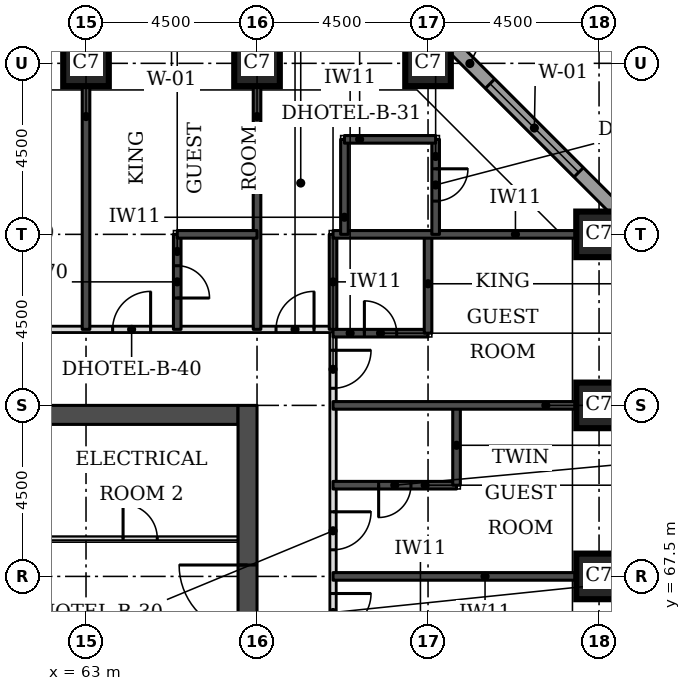
"""IFC4 building model, lengths in metres.
Left out: names, types, materials, properties, quantities, classifications, styles, units other than length and angle.
Written with IfcOpenShell. Run it as: python <this file> out.ifc"""

import sys

from ifc_helpers import new_model, si_unit, direction, frame, frame_2d, origin, origin_2d, place, context, subcontext, project, spatial, rectangle, extrude, element, fill, save


model = new_model("IFC4")
c1 = context("Model", 3, precision=1e-05, world=origin(), true_north=direction((0.0, 1.0)))
c2 = subcontext(c1, "Body", "Model", "MODEL_VIEW")
j1 = project(units=[si_unit("LENGTHUNIT", "METRE"), si_unit("PLANEANGLEUNIT", "RADIAN")], contexts=[c1])
p1 = place(None, origin())
s1 = spatial("IfcSite", under=j1, at=p1, CompositionType="ELEMENT")
p2 = place(p1, origin())
s2 = spatial("IfcBuilding", under=s1, at=p2, CompositionType="ELEMENT")
p3 = place(p2, frame((0.0, 0.0, 52.8)))
s3 = spatial("IfcBuildingStorey", under=s2, at=p3, CompositionType="ELEMENT", Elevation=52.8)
for number, where, z_axis, x_axis in (
    (1, (76.5, 67.5, 0.0), (0.0, 0.0, 1.0), (1.0, 0.0, 0.0)),
    (2, (76.5, 72.0, 0.0), (0.0, 0.0, 1.0), (1.0, 0.0, 0.0)),
    (3, (76.5, 76.5, 0.0), (0.0, 0.0, 1.0), (1.0, 0.0, 0.0)),
    (4, (63.0, 81.0, 0.0), (0.0, 0.0, 1.0), (1.0, 0.0, 0.0)),
    (5, (67.5, 81.0, 0.0), (0.0, 0.0, 1.0), (1.0, 0.0, 0.0)),
    (6, (72.0, 81.0, 0.0), (0.0, 0.0, 1.0), (1.0, 0.0, 0.0)),
):
    element("IfcColumn", number, at=place(p3, frame(where, z_axis=z_axis, x_axis=x_axis)), inside=s3, PredefinedType="COLUMN", context=c2, shape_type="SweptSolid", body=[
        extrude(rectangle(XDim=1.2, YDim=1.2, at=origin_2d()), origin(), (0.0, 0.0, 1.0), 3.3),
    ])
p4 = place(p3, frame((45.5, 71.75, 0.0), z_axis=(0.0, 0.0, 1.0), x_axis=(1.0, 0.0, 0.0)))
e7 = element("IfcWall", 7, at=p4, inside=s3, PredefinedType="SHEAR", context=c2, shape_type="SweptSolid", body=[
    extrude(rectangle(XDim=21.5, YDim=0.5, at=frame_2d((10.75, 0.0))), origin(), (0.0, 0.0, 1.0), 3.3),
])
p5 = place(p3, frame((67.25, 49.5, 0.0), z_axis=(0.0, 0.0, 1.0), x_axis=(0.0, 1.0, 0.0)))
e8 = element("IfcWall", 8, at=p5, inside=s3, PredefinedType="SHEAR", context=c2, shape_type="SweptSolid", body=[
    extrude(rectangle(XDim=22.5, YDim=0.5, at=frame_2d((11.25, 0.0))), origin(), (0.0, 0.0, 1.0), 3.3),
])
p6 = place(p5, frame((4.2, 0.0, 0.0)))
e9 = element("IfcOpeningElement", 9, at=p6, cuts=e8, PredefinedType="OPENING", context=c2, shape_type="SweptSolid", body=[
    extrude(rectangle(XDim=1.8, YDim=2.1, at=frame_2d((0.9, 1.05))), frame((0.0, 0.26, 0.0), z_axis=(0.0, -1.0, 0.0), x_axis=(1.0, 0.0, 0.0)), (0.0, 0.0, 1.0), 0.52),
])
p7 = place(p5, frame((6.9, 0.0, 0.0)))
e10 = element("IfcOpeningElement", 10, at=p7, cuts=e8, PredefinedType="OPENING", context=c2, shape_type="SweptSolid", body=[
    extrude(rectangle(XDim=1.1, YDim=2.1, at=frame_2d((0.55, 1.05))), frame((0.0, 0.26, 0.0), z_axis=(0.0, -1.0, 0.0), x_axis=(1.0, 0.0, 0.0)), (0.0, 0.0, 1.0), 0.52),
])
p8 = place(p5, frame((13.6, 0.0, 0.0)))
e11 = element("IfcOpeningElement", 11, at=p8, cuts=e8, PredefinedType="OPENING", context=c2, shape_type="SweptSolid", body=[
    extrude(rectangle(XDim=1.1, YDim=2.1, at=frame_2d((0.55, 1.05))), frame((0.0, 0.26, 0.0), z_axis=(0.0, -1.0, 0.0), x_axis=(1.0, 0.0, 0.0)), (0.0, 0.0, 1.0), 0.52),
])
p9 = place(p5, frame((16.5, 0.0, 0.0)))
e12 = element("IfcOpeningElement", 12, at=p9, cuts=e8, PredefinedType="OPENING", context=c2, shape_type="SweptSolid", body=[
    extrude(rectangle(XDim=1.8, YDim=2.1, at=frame_2d((0.9, 1.05))), frame((0.0, 0.26, 0.0), z_axis=(0.0, -1.0, 0.0), x_axis=(1.0, 0.0, 0.0)), (0.0, 0.0, 1.0), 0.52),
])
p10 = place(p3, frame((77.326, 76.77, 0.0), z_axis=(0.0, 0.0, 1.0), x_axis=(-0.707106781187, 0.707106781187, 0.0)))
e13 = element("IfcWall", 13, at=p10, inside=s3, PredefinedType="STANDARD", context=c2, shape_type="SweptSolid", body=[
    extrude(rectangle(XDim=7.151, YDim=0.35, at=frame_2d((3.576, 0.0))), origin(), (0.0, 0.0, 1.0), 3.055),
])
p11 = place(p10, frame((1.926, 0.0, 0.8)))
e14 = element("IfcOpeningElement", 14, at=p11, cuts=e13, PredefinedType="OPENING", context=c2, shape_type="SweptSolid", body=[
    extrude(rectangle(XDim=3.3, YDim=1.5, at=frame_2d((1.65, 0.75))), frame((0.0, 0.185, 0.0), z_axis=(0.0, -1.0, 0.0), x_axis=(1.0, 0.0, 0.0)), (0.0, 0.0, 1.0), 0.37),
])
p12 = place(p3, frame((69.5, 47.5, 0.0), z_axis=(0.0, 0.0, 1.0), x_axis=(0.0, 1.0, 0.0)))
e15 = element("IfcWall", 15, at=p12, inside=s3, PredefinedType="PARTITIONING", context=c2, shape_type="SweptSolid", body=[
    extrude(rectangle(XDim=26.5, YDim=0.15, at=frame_2d((13.25, 0.0))), origin(), (0.0, 0.0, 1.0), 3.08),
])
p13 = place(p12, frame((24.95, 0.0, 0.0)))
e16 = element("IfcOpeningElement", 16, at=p13, cuts=e15, PredefinedType="OPENING", context=c2, shape_type="SweptSolid", body=[
    extrude(rectangle(XDim=1.0, YDim=2.1, at=frame_2d((0.5, 1.05))), frame((0.0, 0.085, 0.0), z_axis=(0.0, -1.0, 0.0), x_axis=(1.0, 0.0, 0.0)), (0.0, 0.0, 1.0), 0.17),
])
p14 = place(p12, frame((20.7, 0.0, 0.0)))
e17 = element("IfcOpeningElement", 17, at=p14, cuts=e15, PredefinedType="OPENING", context=c2, shape_type="SweptSolid", body=[
    extrude(rectangle(XDim=1.0, YDim=2.1, at=frame_2d((0.5, 1.05))), frame((0.0, 0.085, 0.0), z_axis=(0.0, -1.0, 0.0), x_axis=(1.0, 0.0, 0.0)), (0.0, 0.0, 1.0), 0.17),
])
p15 = place(p12, frame((18.55, 0.0, 0.0)))
e18 = element("IfcOpeningElement", 18, at=p15, cuts=e15, PredefinedType="OPENING", context=c2, shape_type="SweptSolid", body=[
    extrude(rectangle(XDim=1.0, YDim=2.1, at=frame_2d((0.5, 1.05))), frame((0.0, 0.085, 0.0), z_axis=(0.0, -1.0, 0.0), x_axis=(1.0, 0.0, 0.0)), (0.0, 0.0, 1.0), 0.17),
])
p16 = place(p12, frame((11.7, 0.0, 0.0)))
e19 = element("IfcOpeningElement", 19, at=p16, cuts=e15, PredefinedType="OPENING", context=c2, shape_type="SweptSolid", body=[
    extrude(rectangle(XDim=1.0, YDim=2.1, at=frame_2d((0.5, 1.05))), frame((0.0, 0.085, 0.0), z_axis=(0.0, -1.0, 0.0), x_axis=(1.0, 0.0, 0.0)), (0.0, 0.0, 1.0), 0.17),
])
p17 = place(p12, frame((7.65, 0.0, 0.0)))
e20 = element("IfcOpeningElement", 20, at=p17, cuts=e15, PredefinedType="OPENING", context=c2, shape_type="SweptSolid", body=[
    extrude(rectangle(XDim=1.1, YDim=2.1, at=frame_2d((0.55, 1.05))), frame((0.0, 0.085, 0.0), z_axis=(0.0, -1.0, 0.0), x_axis=(1.0, 0.0, 0.0)), (0.0, 0.0, 1.0), 0.17),
])
p18 = place(p12, frame((0.447, 0.0, 0.0)))
e21 = element("IfcOpeningElement", 21, at=p18, cuts=e15, PredefinedType="OPENING", context=c2, shape_type="SweptSolid", body=[
    extrude(rectangle(XDim=1.0, YDim=2.1, at=frame_2d((0.5, 1.05))), frame((0.0, 0.085, 0.0), z_axis=(0.0, -1.0, 0.0), x_axis=(1.0, 0.0, 0.0)), (0.0, 0.0, 1.0), 0.17),
])
p19 = place(p3, frame((43.0, 74.0, 0.0), z_axis=(0.0, 0.0, 1.0), x_axis=(1.0, 0.0, 0.0)))
e22 = element("IfcWall", 22, at=p19, inside=s3, PredefinedType="PARTITIONING", context=c2, shape_type="SweptSolid", body=[
    extrude(rectangle(XDim=26.5, YDim=0.15, at=frame_2d((13.25, 0.0))), origin(), (0.0, 0.0, 1.0), 3.08),
])
p20 = place(p19, frame((4.65, 0.0, 0.0)))
e23 = element("IfcOpeningElement", 23, at=p20, cuts=e22, PredefinedType="OPENING", context=c2, shape_type="SweptSolid", body=[
    extrude(rectangle(XDim=1.0, YDim=2.1, at=frame_2d((0.5, 1.05))), frame((0.0, 0.085, 0.0), z_axis=(0.0, -1.0, 0.0), x_axis=(1.0, 0.0, 0.0)), (0.0, 0.0, 1.0), 0.17),
])
p21 = place(p19, frame((16.6, 0.0, 0.0)))
e24 = element("IfcOpeningElement", 24, at=p21, cuts=e22, PredefinedType="OPENING", context=c2, shape_type="SweptSolid", body=[
    extrude(rectangle(XDim=1.0, YDim=2.1, at=frame_2d((0.5, 1.05))), frame((0.0, 0.085, 0.0), z_axis=(0.0, -1.0, 0.0), x_axis=(1.0, 0.0, 0.0)), (0.0, 0.0, 1.0), 0.17),
])
p22 = place(p19, frame((20.7, 0.0, 0.0)))
e25 = element("IfcOpeningElement", 25, at=p22, cuts=e22, PredefinedType="OPENING", context=c2, shape_type="SweptSolid", body=[
    extrude(rectangle(XDim=1.0, YDim=2.1, at=frame_2d((0.5, 1.05))), frame((0.0, 0.085, 0.0), z_axis=(0.0, -1.0, 0.0), x_axis=(1.0, 0.0, 0.0)), (0.0, 0.0, 1.0), 0.17),
])
p23 = place(p19, frame((0.5, 0.0, 0.0)))
e26 = element("IfcOpeningElement", 26, at=p23, cuts=e22, PredefinedType="OPENING", context=c2, shape_type="SweptSolid", body=[
    extrude(rectangle(XDim=1.0, YDim=2.1, at=frame_2d((0.5, 1.05))), frame((0.0, 0.085, 0.0), z_axis=(0.0, -1.0, 0.0), x_axis=(1.0, 0.0, 0.0)), (0.0, 0.0, 1.0), 0.17),
])
p24 = place(p19, frame((25.0, 0.0, 0.0)))
e27 = element("IfcOpeningElement", 27, at=p24, cuts=e22, PredefinedType="OPENING", context=c2, shape_type="SweptSolid", body=[
    extrude(rectangle(XDim=1.0, YDim=2.1, at=frame_2d((0.5, 1.05))), frame((0.0, 0.085, 0.0), z_axis=(0.0, -1.0, 0.0), x_axis=(1.0, 0.0, 0.0)), (0.0, 0.0, 1.0), 0.17),
])
p25 = place(p3, frame((69.5, 67.5, 0.0), z_axis=(0.0, 0.0, 1.0), x_axis=(1.0, 0.0, 0.0)))
e28 = element("IfcWall", 28, at=p25, inside=s3, PredefinedType="SOLIDWALL", context=c2, shape_type="SweptSolid", body=[
    extrude(rectangle(XDim=6.4, YDim=0.2, at=frame_2d((3.2, 0.0))), origin(), (0.0, 0.0, 1.0), 3.08),
])
p26 = place(p3, frame((69.5, 69.9, 0.0), z_axis=(0.0, 0.0, 1.0), x_axis=(1.0, 0.0, 0.0)))
e29 = element("IfcWall", 29, at=p26, inside=s3, PredefinedType="SOLIDWALL", context=c2, shape_type="SweptSolid", body=[
    extrude(rectangle(XDim=3.25, YDim=0.2, at=frame_2d((1.625, 0.0))), origin(), (0.0, 0.0, 1.0), 3.08),
])
p27 = place(p26, frame((1.2, 0.0, 0.0)))
e30 = element("IfcOpeningElement", 30, at=p27, cuts=e29, PredefinedType="OPENING", context=c2, shape_type="SweptSolid", body=[
    extrude(rectangle(XDim=0.85, YDim=2.1, at=frame_2d((0.425, 1.05))), frame((0.0, 0.11, 0.0), z_axis=(0.0, -1.0, 0.0), x_axis=(1.0, 0.0, 0.0)), (0.0, 0.0, 1.0), 0.22),
])
p28 = place(p3, frame((72.75, 69.9, 0.0), z_axis=(0.0, 0.0, 1.0), x_axis=(0.0, 1.0, 0.0)))
e31 = element("IfcWall", 31, at=p28, inside=s3, PredefinedType="SOLIDWALL", context=c2, shape_type="SweptSolid", body=[
    extrude(rectangle(XDim=2.1, YDim=0.2, at=frame_2d((1.05, 0.0))), origin(), (0.0, 0.0, 1.0), 3.08),
])
p29 = place(p3, frame((69.5, 72.0, 0.0), z_axis=(0.0, 0.0, 1.0), x_axis=(1.0, 0.0, 0.0)))
e32 = element("IfcWall", 32, at=p29, inside=s3, PredefinedType="SOLIDWALL", context=c2, shape_type="SweptSolid", body=[
    extrude(rectangle(XDim=6.4, YDim=0.2, at=frame_2d((3.2, 0.0))), origin(), (0.0, 0.0, 1.0), 3.08),
])
p30 = place(p3, frame((69.5, 73.9, 0.0), z_axis=(0.0, 0.0, 1.0), x_axis=(1.0, 0.0, 0.0)))
e33 = element("IfcWall", 33, at=p30, inside=s3, PredefinedType="SOLIDWALL", context=c2, shape_type="SweptSolid", body=[
    extrude(rectangle(XDim=2.5, YDim=0.2, at=frame_2d((1.25, 0.0))), origin(), (0.0, 0.0, 1.0), 3.08),
])
p31 = place(p30, frame((0.825, 0.0, 0.0)))
e34 = element("IfcOpeningElement", 34, at=p31, cuts=e33, PredefinedType="OPENING", context=c2, shape_type="SweptSolid", body=[
    extrude(rectangle(XDim=0.85, YDim=2.1, at=frame_2d((0.425, 1.05))), frame((0.0, 0.11, 0.0), z_axis=(0.0, -1.0, 0.0), x_axis=(1.0, 0.0, 0.0)), (0.0, 0.0, 1.0), 0.22),
])
p32 = place(p3, frame((72.0, 73.9, 0.0), z_axis=(0.0, 0.0, 1.0), x_axis=(0.0, 1.0, 0.0)))
e35 = element("IfcWall", 35, at=p32, inside=s3, PredefinedType="SOLIDWALL", context=c2, shape_type="SweptSolid", body=[
    extrude(rectangle(XDim=2.6, YDim=0.2, at=frame_2d((1.3, 0.0))), origin(), (0.0, 0.0, 1.0), 3.08),
])
p33 = place(p3, frame((63.0, 74.0, 0.0), z_axis=(0.0, 0.0, 1.0), x_axis=(0.0, 1.0, 0.0)))
e36 = element("IfcWall", 36, at=p33, inside=s3, PredefinedType="SOLIDWALL", context=c2, shape_type="SweptSolid", body=[
    extrude(rectangle(XDim=6.4, YDim=0.2, at=frame_2d((3.2, 0.0))), origin(), (0.0, 0.0, 1.0), 3.08),
])
p34 = place(p3, frame((65.4, 74.0, 0.0), z_axis=(0.0, 0.0, 1.0), x_axis=(0.0, 1.0, 0.0)))
e37 = element("IfcWall", 37, at=p34, inside=s3, PredefinedType="SOLIDWALL", context=c2, shape_type="SweptSolid", body=[
    extrude(rectangle(XDim=2.5, YDim=0.2, at=frame_2d((1.25, 0.0))), origin(), (0.0, 0.0, 1.0), 3.08),
])
p35 = place(p34, frame((0.825, 0.0, 0.0)))
e38 = element("IfcOpeningElement", 38, at=p35, cuts=e37, PredefinedType="OPENING", context=c2, shape_type="SweptSolid", body=[
    extrude(rectangle(XDim=0.85, YDim=2.1, at=frame_2d((0.425, 1.05))), frame((0.0, 0.11, 0.0), z_axis=(0.0, -1.0, 0.0), x_axis=(1.0, 0.0, 0.0)), (0.0, 0.0, 1.0), 0.22),
])
p36 = place(p3, frame((67.5, 74.0, 0.0), z_axis=(0.0, 0.0, 1.0), x_axis=(0.0, 1.0, 0.0)))
e39 = element("IfcWall", 39, at=p36, inside=s3, PredefinedType="SOLIDWALL", context=c2, shape_type="SweptSolid", body=[
    extrude(rectangle(XDim=6.4, YDim=0.2, at=frame_2d((3.2, 0.0))), origin(), (0.0, 0.0, 1.0), 3.08),
])
p37 = place(p3, frame((69.5, 74.0, 0.0), z_axis=(0.0, 0.0, 1.0), x_axis=(0.0, 1.0, 0.0)))
e40 = element("IfcWall", 40, at=p37, inside=s3, PredefinedType="SOLIDWALL", context=c2, shape_type="SweptSolid", body=[
    extrude(rectangle(XDim=2.5, YDim=0.2, at=frame_2d((1.25, 0.0))), origin(), (0.0, 0.0, 1.0), 3.08),
])
p38 = place(p3, frame((65.4, 76.5, 0.0), z_axis=(0.0, 0.0, 1.0), x_axis=(1.0, 0.0, 0.0)))
e41 = element("IfcWall", 41, at=p38, inside=s3, PredefinedType="SOLIDWALL", context=c2, shape_type="SweptSolid", body=[
    extrude(rectangle(XDim=2.1, YDim=0.2, at=frame_2d((1.05, 0.0))), origin(), (0.0, 0.0, 1.0), 3.08),
])
p39 = place(p3, frame((69.5, 76.5, 0.0), z_axis=(0.0, 0.0, 1.0), x_axis=(1.0, 0.0, 0.0)))
e42 = element("IfcWall", 42, at=p39, inside=s3, PredefinedType="SOLIDWALL", context=c2, shape_type="SweptSolid", body=[
    extrude(rectangle(XDim=6.4, YDim=0.2, at=frame_2d((3.2, 0.0))), origin(), (0.0, 0.0, 1.0), 3.08),
])
p40 = place(p3, frame((69.8, 76.5, 0.0), z_axis=(0.0, 0.0, 1.0), x_axis=(0.0, 1.0, 0.0)))
e43 = element("IfcWall", 43, at=p40, inside=s3, PredefinedType="SOLIDWALL", context=c2, shape_type="SweptSolid", body=[
    extrude(rectangle(XDim=2.5, YDim=0.2, at=frame_2d((1.25, 0.0))), origin(), (0.0, 0.0, 1.0), 3.08),
])
p41 = place(p3, frame((72.2, 76.5, 0.0), z_axis=(0.0, 0.0, 1.0), x_axis=(0.0, 1.0, 0.0)))
e44 = element("IfcWall", 44, at=p41, inside=s3, PredefinedType="SOLIDWALL", context=c2, shape_type="SweptSolid", body=[
    extrude(rectangle(XDim=2.5, YDim=0.2, at=frame_2d((1.25, 0.0))), origin(), (0.0, 0.0, 1.0), 3.08),
])
p42 = place(p41, frame((0.875, 0.0, 0.0)))
e45 = element("IfcOpeningElement", 45, at=p42, cuts=e44, PredefinedType="OPENING", context=c2, shape_type="SweptSolid", body=[
    extrude(rectangle(XDim=0.85, YDim=2.1, at=frame_2d((0.425, 1.05))), frame((0.0, 0.11, 0.0), z_axis=(0.0, -1.0, 0.0), x_axis=(1.0, 0.0, 0.0)), (0.0, 0.0, 1.0), 0.22),
])
p43 = place(p3, frame((69.8, 79.0, 0.0), z_axis=(0.0, 0.0, 1.0), x_axis=(1.0, 0.0, 0.0)))
e46 = element("IfcWall", 46, at=p43, inside=s3, PredefinedType="SOLIDWALL", context=c2, shape_type="SweptSolid", body=[
    extrude(rectangle(XDim=2.4, YDim=0.2, at=frame_2d((1.2, 0.0))), origin(), (0.0, 0.0, 1.0), 3.08),
])
p44 = place(p3, frame((61.85, 68.5, 0.0), z_axis=(0.0, 0.0, 1.0), x_axis=(1.0, 0.0, 0.0)))
e47 = element("IfcWall", 47, at=p44, inside=s3, PredefinedType="PARTITIONING", context=c2, shape_type="SweptSolid", body=[
    extrude(rectangle(XDim=5.15, YDim=0.1, at=frame_2d((2.575, 0.0))), origin(), (0.0, 0.0, 1.0), 3.08),
])
p45 = place(p44, frame((2.125, 0.0, 0.0)))
e48 = element("IfcOpeningElement", 48, at=p45, cuts=e47, PredefinedType="OPENING", context=c2, shape_type="SweptSolid", body=[
    extrude(rectangle(XDim=0.9, YDim=2.1, at=frame_2d((0.45, 1.05))), frame((0.0, 0.06, 0.0), z_axis=(0.0, -1.0, 0.0), x_axis=(1.0, 0.0, 0.0)), (0.0, 0.0, 1.0), 0.12),
])
p46 = place(p11, origin())
e49 = element("IfcWindow", 49, at=p46, inside=s3, PartitioningType="SINGLE_PANEL", PredefinedType="WINDOW", context=c2, shape_type="SweptSolid", body=[
    extrude(rectangle(XDim=3.3, YDim=1.5, at=frame_2d((1.65, 0.75))), frame((0.0, 0.085, 0.0), z_axis=(0.0, -1.0, 0.0), x_axis=(1.0, 0.0, 0.0)), (0.0, 0.0, 1.0), 0.06),
])
fill(e14, e49)
p47 = place(p22, origin())
e50 = element("IfcDoor", 50, at=p47, inside=s3, OperationType="SINGLE_SWING_RIGHT", PredefinedType="DOOR", context=c2, shape_type="SweptSolid", body=[
    extrude(rectangle(XDim=1.0, YDim=2.1, at=frame_2d((0.5, 1.05))), frame((0.0, 0.025, 0.0), z_axis=(0.0, -1.0, 0.0), x_axis=(1.0, 0.0, 0.0)), (0.0, 0.0, 1.0), 0.05),
])
fill(e25, e50)
p48 = place(p35, frame((0.85, 0.0, 0.0), z_axis=(0.0, 0.0, 1.0), x_axis=(-1.0, 0.0, 0.0)))
e51 = element("IfcDoor", 51, at=p48, inside=s3, OperationType="SINGLE_SWING_RIGHT", PredefinedType="DOOR", context=c2, shape_type="SweptSolid", body=[
    extrude(rectangle(XDim=0.85, YDim=2.1, at=frame_2d((0.425, 1.05))), frame((0.0, 0.025, 0.0), z_axis=(0.0, -1.0, 0.0), x_axis=(1.0, 0.0, 0.0)), (0.0, 0.0, 1.0), 0.05),
])
fill(e38, e51)
p49 = place(p13, frame((1.0, 0.0, 0.0), z_axis=(0.0, 0.0, 1.0), x_axis=(-1.0, 0.0, 0.0)))
e52 = element("IfcDoor", 52, at=p49, inside=s3, OperationType="SINGLE_SWING_LEFT", PredefinedType="DOOR", context=c2, shape_type="SweptSolid", body=[
    extrude(rectangle(XDim=1.0, YDim=2.1, at=frame_2d((0.5, 1.05))), frame((0.0, 0.025, 0.0), z_axis=(0.0, -1.0, 0.0), x_axis=(1.0, 0.0, 0.0)), (0.0, 0.0, 1.0), 0.05),
])
fill(e16, e52)
p50 = place(p31, origin())
e53 = element("IfcDoor", 53, at=p50, inside=s3, OperationType="SINGLE_SWING_LEFT", PredefinedType="DOOR", context=c2, shape_type="SweptSolid", body=[
    extrude(rectangle(XDim=0.85, YDim=2.1, at=frame_2d((0.425, 1.05))), frame((0.0, 0.025, 0.0), z_axis=(0.0, -1.0, 0.0), x_axis=(1.0, 0.0, 0.0)), (0.0, 0.0, 1.0), 0.05),
])
fill(e34, e53)
p51 = place(p14, frame((1.0, 0.0, 0.0), z_axis=(0.0, 0.0, 1.0), x_axis=(-1.0, 0.0, 0.0)))
e54 = element("IfcDoor", 54, at=p51, inside=s3, OperationType="SINGLE_SWING_LEFT", PredefinedType="DOOR", context=c2, shape_type="SweptSolid", body=[
    extrude(rectangle(XDim=1.0, YDim=2.1, at=frame_2d((0.5, 1.05))), frame((0.0, 0.025, 0.0), z_axis=(0.0, -1.0, 0.0), x_axis=(1.0, 0.0, 0.0)), (0.0, 0.0, 1.0), 0.05),
])
fill(e17, e54)
p52 = place(p27, frame((0.85, 0.0, 0.0), z_axis=(0.0, 0.0, 1.0), x_axis=(-1.0, 0.0, 0.0)))
e55 = element("IfcDoor", 55, at=p52, inside=s3, OperationType="SINGLE_SWING_RIGHT", PredefinedType="DOOR", context=c2, shape_type="SweptSolid", body=[
    extrude(rectangle(XDim=0.85, YDim=2.1, at=frame_2d((0.425, 1.05))), frame((0.0, 0.025, 0.0), z_axis=(0.0, -1.0, 0.0), x_axis=(1.0, 0.0, 0.0)), (0.0, 0.0, 1.0), 0.05),
])
fill(e30, e55)
p53 = place(p15, frame((1.0, 0.0, 0.0), z_axis=(0.0, 0.0, 1.0), x_axis=(-1.0, 0.0, 0.0)))
e56 = element("IfcDoor", 56, at=p53, inside=s3, OperationType="SINGLE_SWING_LEFT", PredefinedType="DOOR", context=c2, shape_type="SweptSolid", body=[
    extrude(rectangle(XDim=1.0, YDim=2.1, at=frame_2d((0.5, 1.05))), frame((0.0, 0.025, 0.0), z_axis=(0.0, -1.0, 0.0), x_axis=(1.0, 0.0, 0.0)), (0.0, 0.0, 1.0), 0.05),
])
fill(e18, e56)
p54 = place(p24, origin())
e57 = element("IfcDoor", 57, at=p54, inside=s3, OperationType="SINGLE_SWING_RIGHT", PredefinedType="DOOR", context=c2, shape_type="SweptSolid", body=[
    extrude(rectangle(XDim=1.0, YDim=2.1, at=frame_2d((0.5, 1.05))), frame((0.0, 0.025, 0.0), z_axis=(0.0, -1.0, 0.0), x_axis=(1.0, 0.0, 0.0)), (0.0, 0.0, 1.0), 0.05),
])
fill(e27, e57)
p55 = place(p42, frame((0.85, 0.0, 0.0), z_axis=(0.0, 0.0, 1.0), x_axis=(-1.0, 0.0, 0.0)))
e58 = element("IfcDoor", 58, at=p55, inside=s3, OperationType="SINGLE_SWING_LEFT", PredefinedType="DOOR", context=c2, shape_type="SweptSolid", body=[
    extrude(rectangle(XDim=0.85, YDim=2.1, at=frame_2d((0.425, 1.05))), frame((0.0, 0.025, 0.0), z_axis=(0.0, -1.0, 0.0), x_axis=(1.0, 0.0, 0.0)), (0.0, 0.0, 1.0), 0.05),
])
fill(e45, e58)
p56 = place(p9, origin())
e59 = element("IfcDoor", 59, at=p56, inside=s3, OperationType="SINGLE_SWING_RIGHT", PredefinedType="DOOR", context=c2, shape_type="SweptSolid", body=[
    extrude(rectangle(XDim=1.8, YDim=2.1, at=frame_2d((0.9, 1.05))), frame((0.0, 0.025, 0.0), z_axis=(0.0, -1.0, 0.0), x_axis=(1.0, 0.0, 0.0)), (0.0, 0.0, 1.0), 0.05),
])
fill(e12, e59)
p57 = place(p45, origin())
e60 = element("IfcDoor", 60, at=p57, inside=s3, OperationType="SINGLE_SWING_LEFT", PredefinedType="DOOR", context=c2, shape_type="SweptSolid", body=[
    extrude(rectangle(XDim=0.9, YDim=2.1, at=frame_2d((0.45, 1.05))), frame((0.0, 0.025, 0.0), z_axis=(0.0, -1.0, 0.0), x_axis=(1.0, 0.0, 0.0)), (0.0, 0.0, 1.0), 0.05),
])
fill(e48, e60)
save(model, sys.argv[1])
